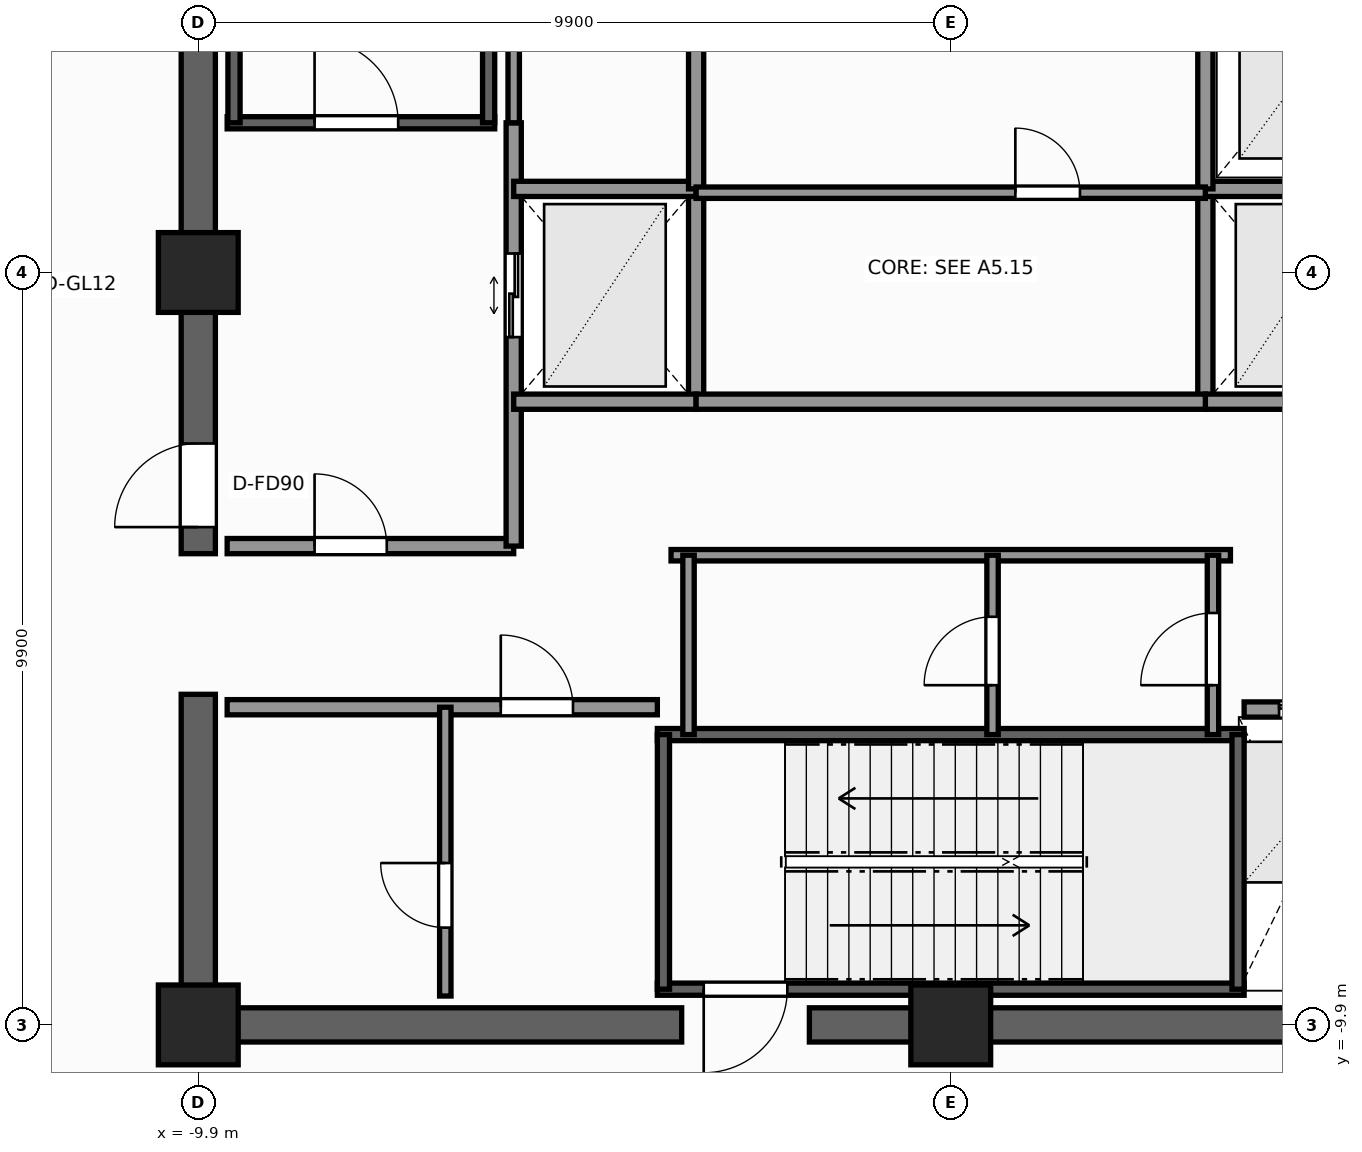
"""IFC4 building model, lengths in metres.
Left out: names, types, materials, properties, quantities, classifications, styles, units other than length and angle.
Written with IfcOpenShell. Run it as: python <this file> out.ifc"""

import sys

from ifc_helpers import new_model, si_unit, direction, frame, frame_2d, origin, origin_2d, place, context, subcontext, project, spatial, rectangle, extrude, element, fill, save


model = new_model("IFC4")
c1 = context("Model", 3, precision=1e-05, world=origin(), true_north=direction((0.0, 1.0)))
c2 = subcontext(c1, "Body", "Model", "MODEL_VIEW")
j1 = project(units=[si_unit("LENGTHUNIT", "METRE"), si_unit("PLANEANGLEUNIT", "RADIAN")], contexts=[c1])
p1 = place(None, origin())
s1 = spatial("IfcSite", under=j1, at=p1, CompositionType="ELEMENT")
p2 = place(p1, origin())
s2 = spatial("IfcBuilding", under=s1, at=p2, CompositionType="ELEMENT")
p3 = place(p2, frame((0.0, 0.0, 267.4)))
s3 = spatial("IfcBuildingStorey", under=s2, at=p3, CompositionType="ELEMENT", Elevation=267.4)
p4 = place(p3, frame((10.125, -9.9, 0.0), z_axis=(0.0, 0.0, 1.0), x_axis=(-1.0, 0.0, 0.0)))
e1 = element("IfcWall", 1, at=p4, inside=s3, PredefinedType="SHEAR", context=c2, shape_type="SweptSolid", body=[
    extrude(rectangle(XDim=11.985, YDim=0.45, at=frame_2d((5.993, 0.0))), origin(), (0.0, 0.0, 1.0), 5.0),
])
p5 = place(p3, frame((-3.54, -9.9, 0.0), z_axis=(0.0, 0.0, 1.0), x_axis=(-1.0, 0.0, 0.0)))
e2 = element("IfcWall", 2, at=p5, inside=s3, PredefinedType="SHEAR", context=c2, shape_type="SweptSolid", body=[
    extrude(rectangle(XDim=6.585, YDim=0.45, at=frame_2d((3.292, 0.0))), origin(), (0.0, 0.0, 1.0), 5.0),
])
p6 = place(p3, frame((-9.9, -9.675, 0.0), z_axis=(0.0, 0.0, 1.0), x_axis=(0.0, 1.0, 0.0)))
e3 = element("IfcWall", 3, at=p6, inside=s3, PredefinedType="SHEAR", context=c2, shape_type="SweptSolid", body=[
    extrude(rectangle(XDim=4.125, YDim=0.45, at=frame_2d((2.062, 0.0))), origin(), (0.0, 0.0, 1.0), 5.0),
])
p7 = place(p3, frame((-9.9, -3.7, 0.0), z_axis=(0.0, 0.0, 1.0), x_axis=(0.0, 1.0, 0.0)))
e4 = element("IfcWall", 4, at=p7, inside=s3, PredefinedType="SHEAR", context=c2, shape_type="SweptSolid", body=[
    extrude(rectangle(XDim=13.375, YDim=0.45, at=frame_2d((6.688, 0.0))), origin(), (0.0, 0.0, 1.0), 5.0),
])
p8 = place(p7, frame((0.35, 0.0, 0.0)))
e5 = element("IfcOpeningElement", 5, at=p8, cuts=e4, PredefinedType="OPENING", context=c2, shape_type="SweptSolid", body=[
    extrude(rectangle(XDim=1.1, YDim=2.2, at=frame_2d((0.55, 1.1))), frame((0.0, 0.235, 0.0), z_axis=(0.0, -1.0, 0.0), x_axis=(1.0, 0.0, 0.0)), (0.0, 0.0, 1.0), 0.47),
])
for number, where, z_axis, x_axis in (
    (6, (-9.9, -9.9, 0.0), (0.0, 0.0, 1.0), (1.0, 0.0, 0.0)),
    (7, (0.0, -9.9, 0.0), (0.0, 0.0, 1.0), (1.0, 0.0, 0.0)),
    (8, (-9.9, 0.0, 0.0), (0.0, 0.0, 1.0), (1.0, 0.0, 0.0)),
):
    element("IfcColumn", number, at=place(p3, frame(where, z_axis=z_axis, x_axis=x_axis)), inside=s3, PredefinedType="COLUMN", context=c2, shape_type="SweptSolid", body=[
        extrude(rectangle(XDim=1.05, YDim=1.05, at=origin_2d()), origin(), (0.0, 0.0, 1.0), 5.0),
    ])
p9 = place(p3, frame((-9.52, 1.97, 0.0), z_axis=(0.0, 0.0, 1.0), x_axis=(1.0, 0.0, 0.0)))
e9 = element("IfcWall", 9, at=p9, inside=s3, PredefinedType="SHEAR", context=c2, shape_type="SweptSolid", body=[
    extrude(rectangle(XDim=3.52, YDim=0.16, at=frame_2d((1.76, 0.0))), origin(), (0.0, 0.0, 1.0), 5.0),
])
p10 = place(p9, frame((1.15, 0.0, 0.0)))
e10 = element("IfcOpeningElement", 10, at=p10, cuts=e9, PredefinedType="OPENING", context=c2, shape_type="SweptSolid", body=[
    extrude(rectangle(XDim=1.1, YDim=2.2, at=frame_2d((0.55, 1.1))), frame((0.0, 0.09, 0.0), z_axis=(0.0, -1.0, 0.0), x_axis=(1.0, 0.0, 0.0)), (0.0, 0.0, 1.0), 0.18),
])
for number, where, z_axis, x_axis in (
    (11, (-9.43, 1.97, 0.0), (0.0, 0.0, 1.0), (0.0, 1.0, 0.0)),
    (12, (-6.08, 1.97, 0.0), (0.0, 0.0, 1.0), (0.0, 1.0, 0.0)),
):
    element("IfcWall", number, at=place(p3, frame(where, z_axis=z_axis, x_axis=x_axis)), inside=s3, PredefinedType="SHEAR", context=c2, shape_type="SweptSolid", body=[
        extrude(rectangle(XDim=7.56, YDim=0.16, at=frame_2d((3.78, 0.0))), origin(), (0.0, 0.0, 1.0), 5.0),
    ])
p11 = place(p3, frame((3.86, -9.43, 0.0), z_axis=(0.0, 0.0, 1.0), x_axis=(-1.0, 0.0, 0.0)))
e13 = element("IfcWall", 13, at=p11, inside=s3, PredefinedType="SHEAR", context=c2, shape_type="SweptSolid", body=[
    extrude(rectangle(XDim=7.72, YDim=0.16, at=frame_2d((3.86, 0.0))), origin(), (0.0, 0.0, 1.0), 5.0),
])
p12 = place(p11, frame((6.01, 0.0, 0.0)))
e14 = element("IfcOpeningElement", 14, at=p12, cuts=e13, PredefinedType="OPENING", context=c2, shape_type="SweptSolid", body=[
    extrude(rectangle(XDim=1.1, YDim=2.2, at=frame_2d((0.55, 1.1))), frame((0.0, 0.09, 0.0), z_axis=(0.0, -1.0, 0.0), x_axis=(1.0, 0.0, 0.0)), (0.0, 0.0, 1.0), 0.18),
])
p13 = place(p3, frame((-3.86, -6.08, 0.0), z_axis=(0.0, 0.0, 1.0), x_axis=(1.0, 0.0, 0.0)))
e15 = element("IfcWall", 15, at=p13, inside=s3, PredefinedType="SHEAR", context=c2, shape_type="SweptSolid", body=[
    extrude(rectangle(XDim=7.72, YDim=0.16, at=frame_2d((3.86, 0.0))), origin(), (0.0, 0.0, 1.0), 5.0),
])
for number, where, z_axis, x_axis in (
    (16, (-3.78, -9.43, 0.0), (0.0, 0.0, 1.0), (0.0, 1.0, 0.0)),
    (17, (3.78, -9.43, 0.0), (0.0, 0.0, 1.0), (0.0, 1.0, 0.0)),
):
    element("IfcWall", number, at=place(p3, frame(where, z_axis=z_axis, x_axis=x_axis)), inside=s3, PredefinedType="SHEAR", context=c2, shape_type="SweptSolid", body=[
        extrude(rectangle(XDim=3.35, YDim=0.16, at=frame_2d((1.675, 0.0))), origin(), (0.0, 0.0, 1.0), 5.0),
    ])
p14 = place(p3, frame((-9.52, -3.6, 0.0), z_axis=(0.0, 0.0, 1.0), x_axis=(1.0, 0.0, 0.0)))
e18 = element("IfcWall", 18, at=p14, inside=s3, PredefinedType="SOLIDWALL", context=c2, shape_type="SweptSolid", body=[
    extrude(rectangle(XDim=3.77, YDim=0.2, at=frame_2d((1.885, 0.0))), origin(), (0.0, 0.0, 1.0), 4.7),
])
p15 = place(p14, frame((1.15, 0.0, 0.0)))
e19 = element("IfcOpeningElement", 19, at=p15, cuts=e18, PredefinedType="OPENING", context=c2, shape_type="SweptSolid", body=[
    extrude(rectangle(XDim=0.95, YDim=2.06, at=frame_2d((0.475, 1.03))), frame((0.0, 0.11, 0.0), z_axis=(0.0, -1.0, 0.0), x_axis=(1.0, 0.0, 0.0)), (0.0, 0.0, 1.0), 0.22),
])
p16 = place(p3, frame((-5.75, -3.6, 0.0), z_axis=(0.0, 0.0, 1.0), x_axis=(0.0, 1.0, 0.0)))
e20 = element("IfcWall", 20, at=p16, inside=s3, PredefinedType="SOLIDWALL", context=c2, shape_type="SweptSolid", body=[
    extrude(rectangle(XDim=5.57, YDim=0.2, at=frame_2d((2.785, 0.0))), origin(), (0.0, 0.0, 1.0), 4.7),
])
p17 = place(p16, frame((2.75, 0.0, 0.0)))
e21 = element("IfcOpeningElement", 21, at=p17, cuts=e20, PredefinedType="OPENING", context=c2, shape_type="SweptSolid", body=[
    extrude(rectangle(XDim=1.1, YDim=2.2, at=frame_2d((0.55, 1.1))), frame((0.0, 0.11, 0.0), z_axis=(0.0, -1.0, 0.0), x_axis=(1.0, 0.0, 0.0)), (0.0, 0.0, 1.0), 0.22),
])
p18 = place(p3, frame((-3.35, -1.7, 0.0), z_axis=(0.0, 0.0, 1.0), x_axis=(0.0, 1.0, 0.0)))
e22 = element("IfcWall", 22, at=p18, inside=s3, PredefinedType="SOLIDWALL", context=c2, shape_type="SweptSolid", body=[
    extrude(rectangle(XDim=2.8, YDim=0.2, at=frame_2d((1.4, 0.0))), origin(), (0.0, 0.0, 1.0), 4.7),
])
for number, where, z_axis, x_axis in (
    (23, (-5.75, -1.7, 0.0), (0.0, 0.0, 1.0), (1.0, 0.0, 0.0)),
    (24, (-5.75, 1.1, 0.0), (0.0, 0.0, 1.0), (1.0, 0.0, 0.0)),
):
    element("IfcWall", number, at=place(p3, frame(where, z_axis=z_axis, x_axis=x_axis)), inside=s3, PredefinedType="SOLIDWALL", context=c2, shape_type="SweptSolid", body=[
        extrude(rectangle(XDim=2.4, YDim=0.2, at=frame_2d((1.2, 0.0))), origin(), (0.0, 0.0, 1.0), 4.7),
    ])
p19 = place(p3, frame((3.35, -1.7, 0.0), z_axis=(0.0, 0.0, 1.0), x_axis=(0.0, 1.0, 0.0)))
e25 = element("IfcWall", 25, at=p19, inside=s3, PredefinedType="SOLIDWALL", context=c2, shape_type="SweptSolid", body=[
    extrude(rectangle(XDim=2.8, YDim=0.2, at=frame_2d((1.4, 0.0))), origin(), (0.0, 0.0, 1.0), 4.7),
])
for number, where, z_axis, x_axis in (
    (26, (3.35, -1.7, 0.0), (0.0, 0.0, 1.0), (1.0, 0.0, 0.0)),
    (27, (3.35, 1.1, 0.0), (0.0, 0.0, 1.0), (1.0, 0.0, 0.0)),
):
    element("IfcWall", number, at=place(p3, frame(where, z_axis=z_axis, x_axis=x_axis)), inside=s3, PredefinedType="SOLIDWALL", context=c2, shape_type="SweptSolid", body=[
        extrude(rectangle(XDim=2.4, YDim=0.2, at=frame_2d((1.2, 0.0))), origin(), (0.0, 0.0, 1.0), 4.7),
    ])
p20 = place(p3, frame((-9.52, -5.72, 0.0), z_axis=(0.0, 0.0, 1.0), x_axis=(1.0, 0.0, 0.0)))
e28 = element("IfcWall", 28, at=p20, inside=s3, PredefinedType="SOLIDWALL", context=c2, shape_type="SweptSolid", body=[
    extrude(rectangle(XDim=5.66, YDim=0.2, at=frame_2d((2.83, 0.0))), origin(), (0.0, 0.0, 1.0), 4.7),
])
p21 = place(p20, frame((3.6, 0.0, 0.0)))
e29 = element("IfcOpeningElement", 29, at=p21, cuts=e28, PredefinedType="OPENING", context=c2, shape_type="SweptSolid", body=[
    extrude(rectangle(XDim=0.95, YDim=2.06, at=frame_2d((0.475, 1.03))), frame((0.0, 0.11, 0.0), z_axis=(0.0, -1.0, 0.0), x_axis=(1.0, 0.0, 0.0)), (0.0, 0.0, 1.0), 0.22),
])
p22 = place(p3, frame((-6.65, -9.52, 0.0), z_axis=(0.0, 0.0, 1.0), x_axis=(0.0, 1.0, 0.0)))
e30 = element("IfcWall", 30, at=p22, inside=s3, PredefinedType="PARTITIONING", context=c2, shape_type="SweptSolid", body=[
    extrude(rectangle(XDim=3.8, YDim=0.15, at=frame_2d((1.9, 0.0))), origin(), (0.0, 0.0, 1.0), 4.7),
])
p23 = place(p22, frame((0.9, 0.0, 0.0)))
e31 = element("IfcOpeningElement", 31, at=p23, cuts=e30, PredefinedType="OPENING", context=c2, shape_type="SweptSolid", body=[
    extrude(rectangle(XDim=0.85, YDim=2.03, at=frame_2d((0.425, 1.015))), frame((0.0, 0.085, 0.0), z_axis=(0.0, -1.0, 0.0), x_axis=(1.0, 0.0, 0.0)), (0.0, 0.0, 1.0), 0.17),
])
p24 = place(p3, frame((3.86, -5.75, 0.0), z_axis=(0.0, 0.0, 1.0), x_axis=(1.0, 0.0, 0.0)))
e32 = element("IfcWall", 32, at=p24, inside=s3, PredefinedType="SOLIDWALL", context=c2, shape_type="SweptSolid", body=[
    extrude(rectangle(XDim=5.66, YDim=0.2, at=frame_2d((2.83, 0.0))), origin(), (0.0, 0.0, 1.0), 4.7),
])
p25 = place(p24, frame((0.46, 0.0, 0.0)))
e33 = element("IfcOpeningElement", 33, at=p25, cuts=e32, PredefinedType="OPENING", context=c2, shape_type="SweptSolid", body=[
    extrude(rectangle(XDim=1.1, YDim=2.2, at=frame_2d((0.55, 1.1))), frame((0.0, 0.11, 0.0), z_axis=(0.0, -1.0, 0.0), x_axis=(1.0, 0.0, 0.0)), (0.0, 0.0, 1.0), 0.22),
])
p26 = place(p24, frame((2.39, 0.0, 0.0)))
e34 = element("IfcOpeningElement", 34, at=p26, cuts=e32, PredefinedType="OPENING", context=c2, shape_type="SweptSolid", body=[
    extrude(rectangle(XDim=1.1, YDim=2.2, at=frame_2d((0.55, 1.1))), frame((0.0, 0.11, 0.0), z_axis=(0.0, -1.0, 0.0), x_axis=(1.0, 0.0, 0.0)), (0.0, 0.0, 1.0), 0.22),
])
p27 = place(p24, frame((4.32, 0.0, 0.0)))
e35 = element("IfcOpeningElement", 35, at=p27, cuts=e32, PredefinedType="OPENING", context=c2, shape_type="SweptSolid", body=[
    extrude(rectangle(XDim=1.1, YDim=2.2, at=frame_2d((0.55, 1.1))), frame((0.0, 0.11, 0.0), z_axis=(0.0, -1.0, 0.0), x_axis=(1.0, 0.0, 0.0)), (0.0, 0.0, 1.0), 0.22),
])
p28 = place(p3, frame((-3.35, -1.7, 0.0), z_axis=(0.0, 0.0, 1.0), x_axis=(1.0, 0.0, 0.0)))
e36 = element("IfcWall", 36, at=p28, inside=s3, PredefinedType="SOLIDWALL", context=c2, shape_type="SweptSolid", body=[
    extrude(rectangle(XDim=6.7, YDim=0.2, at=frame_2d((3.35, 0.0))), origin(), (0.0, 0.0, 1.0), 4.7),
])
for number, where, z_axis, x_axis in (
    (37, (-3.35, 1.1, 0.0), (0.0, 0.0, 1.0), (0.0, 1.0, 0.0)),
    (38, (3.35, 1.1, 0.0), (0.0, 0.0, 1.0), (0.0, 1.0, 0.0)),
):
    element("IfcWall", number, at=place(p3, frame(where, z_axis=z_axis, x_axis=x_axis)), inside=s3, PredefinedType="SOLIDWALL", context=c2, shape_type="SweptSolid", body=[
        extrude(rectangle(XDim=3.2, YDim=0.2, at=frame_2d((1.6, 0.0))), origin(), (0.0, 0.0, 1.0), 4.7),
    ])
p29 = place(p3, frame((-3.35, 1.05, 0.0), z_axis=(0.0, 0.0, 1.0), x_axis=(1.0, 0.0, 0.0)))
e39 = element("IfcWall", 39, at=p29, inside=s3, PredefinedType="PARTITIONING", context=c2, shape_type="SweptSolid", body=[
    extrude(rectangle(XDim=6.7, YDim=0.15, at=frame_2d((3.35, 0.0))), origin(), (0.0, 0.0, 1.0), 4.7),
])
p30 = place(p29, frame((4.2, 0.0, 0.0)))
e40 = element("IfcOpeningElement", 40, at=p30, cuts=e39, PredefinedType="OPENING", context=c2, shape_type="SweptSolid", body=[
    extrude(rectangle(XDim=0.85, YDim=2.03, at=frame_2d((0.425, 1.015))), frame((0.0, 0.085, 0.0), z_axis=(0.0, -1.0, 0.0), x_axis=(1.0, 0.0, 0.0)), (0.0, 0.0, 1.0), 0.17),
])
p31 = place(p3, frame((-3.68, -3.72, 0.0), z_axis=(0.0, 0.0, 1.0), x_axis=(1.0, 0.0, 0.0)))
e41 = element("IfcWall", 41, at=p31, inside=s3, PredefinedType="PARTITIONING", context=c2, shape_type="SweptSolid", body=[
    extrude(rectangle(XDim=7.36, YDim=0.15, at=frame_2d((3.68, 0.0))), origin(), (0.0, 0.0, 1.0), 4.7),
])
p32 = place(p3, frame((3.45, -6.08, 0.0), z_axis=(0.0, 0.0, 1.0), x_axis=(0.0, 1.0, 0.0)))
e42 = element("IfcWall", 42, at=p32, inside=s3, PredefinedType="PARTITIONING", context=c2, shape_type="SweptSolid", body=[
    extrude(rectangle(XDim=2.36, YDim=0.15, at=frame_2d((1.18, 0.0))), origin(), (0.0, 0.0, 1.0), 4.7),
])
p33 = place(p32, frame((0.65, 0.0, 0.0)))
e43 = element("IfcOpeningElement", 43, at=p33, cuts=e42, PredefinedType="OPENING", context=c2, shape_type="SweptSolid", body=[
    extrude(rectangle(XDim=0.95, YDim=2.06, at=frame_2d((0.475, 1.03))), frame((0.0, 0.085, 0.0), z_axis=(0.0, -1.0, 0.0), x_axis=(1.0, 0.0, 0.0)), (0.0, 0.0, 1.0), 0.17),
])
p34 = place(p3, frame((-3.45, -6.08, 0.0), z_axis=(0.0, 0.0, 1.0), x_axis=(0.0, 1.0, 0.0)))
e44 = element("IfcWall", 44, at=p34, inside=s3, PredefinedType="PARTITIONING", context=c2, shape_type="SweptSolid", body=[
    extrude(rectangle(XDim=2.36, YDim=0.15, at=frame_2d((1.18, 0.0))), origin(), (0.0, 0.0, 1.0), 4.7),
])
p35 = place(p3, frame((0.55, -6.08, 0.0), z_axis=(0.0, 0.0, 1.0), x_axis=(0.0, 1.0, 0.0)))
e45 = element("IfcWall", 45, at=p35, inside=s3, PredefinedType="PARTITIONING", context=c2, shape_type="SweptSolid", body=[
    extrude(rectangle(XDim=2.36, YDim=0.15, at=frame_2d((1.18, 0.0))), origin(), (0.0, 0.0, 1.0), 4.7),
])
p36 = place(p35, frame((0.65, 0.0, 0.0)))
e46 = element("IfcOpeningElement", 46, at=p36, cuts=e45, PredefinedType="OPENING", context=c2, shape_type="SweptSolid", body=[
    extrude(rectangle(XDim=0.9, YDim=2.06, at=frame_2d((0.45, 1.03))), frame((0.0, 0.085, 0.0), z_axis=(0.0, -1.0, 0.0), x_axis=(1.0, 0.0, 0.0)), (0.0, 0.0, 1.0), 0.17),
])
p37 = place(p3, frame((-5.75, 1.97, 0.0), z_axis=(0.0, 0.0, 1.0), x_axis=(0.0, 1.0, 0.0)))
e47 = element("IfcWall", 47, at=p37, inside=s3, PredefinedType="PARTITIONING", context=c2, shape_type="SweptSolid", body=[
    extrude(rectangle(XDim=2.33, YDim=0.15, at=frame_2d((1.165, 0.0))), origin(), (0.0, 0.0, 1.0), 4.7),
])
p38 = place(p10, origin())
e48 = element("IfcDoor", 48, at=p38, inside=s3, OperationType="SINGLE_SWING_LEFT", PredefinedType="DOOR", context=c2, shape_type="SweptSolid", body=[
    extrude(rectangle(XDim=1.1, YDim=2.2, at=frame_2d((0.55, 1.1))), frame((0.0, 0.025, 0.0), z_axis=(0.0, -1.0, 0.0), x_axis=(1.0, 0.0, 0.0)), (0.0, 0.0, 1.0), 0.05),
])
fill(e10, e48)
p39 = place(p12, origin())
e49 = element("IfcDoor", 49, at=p39, inside=s3, OperationType="SINGLE_SWING_RIGHT", PredefinedType="DOOR", context=c2, shape_type="SweptSolid", body=[
    extrude(rectangle(XDim=1.1, YDim=2.2, at=frame_2d((0.55, 1.1))), frame((0.0, 0.025, 0.0), z_axis=(0.0, -1.0, 0.0), x_axis=(1.0, 0.0, 0.0)), (0.0, 0.0, 1.0), 0.05),
])
fill(e14, e49)
p40 = place(p8, origin())
e50 = element("IfcDoor", 50, at=p40, inside=s3, OperationType="SINGLE_SWING_LEFT", PredefinedType="DOOR", context=c2, shape_type="SweptSolid", body=[
    extrude(rectangle(XDim=1.1, YDim=2.2, at=frame_2d((0.55, 1.1))), frame((0.0, 0.025, 0.0), z_axis=(0.0, -1.0, 0.0), x_axis=(1.0, 0.0, 0.0)), (0.0, 0.0, 1.0), 0.05),
])
fill(e5, e50)
p41 = place(p17, origin())
e51 = element("IfcDoor", 51, at=p41, inside=s3, OperationType="DOUBLE_DOOR_SLIDING", PredefinedType="DOOR", context=c2, shape_type="SweptSolid", body=[
    extrude(rectangle(XDim=1.1, YDim=2.2, at=frame_2d((0.55, 1.1))), frame((0.0, 0.025, 0.0), z_axis=(0.0, -1.0, 0.0), x_axis=(1.0, 0.0, 0.0)), (0.0, 0.0, 1.0), 0.05),
])
fill(e21, e51)
p42 = place(p21, origin())
e52 = element("IfcDoor", 52, at=p42, inside=s3, OperationType="SINGLE_SWING_LEFT", PredefinedType="DOOR", context=c2, shape_type="SweptSolid", body=[
    extrude(rectangle(XDim=0.95, YDim=2.06, at=frame_2d((0.475, 1.03))), frame((0.0, 0.025, 0.0), z_axis=(0.0, -1.0, 0.0), x_axis=(1.0, 0.0, 0.0)), (0.0, 0.0, 1.0), 0.05),
])
fill(e29, e52)
p43 = place(p23, origin())
e53 = element("IfcDoor", 53, at=p43, inside=s3, OperationType="SINGLE_SWING_RIGHT", PredefinedType="DOOR", context=c2, shape_type="SweptSolid", body=[
    extrude(rectangle(XDim=0.85, YDim=2.03, at=frame_2d((0.425, 1.015))), frame((0.0, 0.025, 0.0), z_axis=(0.0, -1.0, 0.0), x_axis=(1.0, 0.0, 0.0)), (0.0, 0.0, 1.0), 0.05),
])
fill(e31, e53)
p44 = place(p15, origin())
e54 = element("IfcDoor", 54, at=p44, inside=s3, OperationType="SINGLE_SWING_LEFT", PredefinedType="DOOR", context=c2, shape_type="SweptSolid", body=[
    extrude(rectangle(XDim=0.95, YDim=2.06, at=frame_2d((0.475, 1.03))), frame((0.0, 0.025, 0.0), z_axis=(0.0, -1.0, 0.0), x_axis=(1.0, 0.0, 0.0)), (0.0, 0.0, 1.0), 0.05),
])
fill(e19, e54)
p45 = place(p25, origin())
e55 = element("IfcDoor", 55, at=p45, inside=s3, OperationType="DOUBLE_DOOR_SLIDING", PredefinedType="DOOR", context=c2, shape_type="SweptSolid", body=[
    extrude(rectangle(XDim=1.1, YDim=2.2, at=frame_2d((0.55, 1.1))), frame((0.0, 0.025, 0.0), z_axis=(0.0, -1.0, 0.0), x_axis=(1.0, 0.0, 0.0)), (0.0, 0.0, 1.0), 0.05),
])
fill(e33, e55)
p46 = place(p30, origin())
e56 = element("IfcDoor", 56, at=p46, inside=s3, OperationType="SINGLE_SWING_LEFT", PredefinedType="DOOR", context=c2, shape_type="SweptSolid", body=[
    extrude(rectangle(XDim=0.85, YDim=2.03, at=frame_2d((0.425, 1.015))), frame((0.0, 0.025, 0.0), z_axis=(0.0, -1.0, 0.0), x_axis=(1.0, 0.0, 0.0)), (0.0, 0.0, 1.0), 0.05),
])
fill(e40, e56)
p47 = place(p33, origin())
e57 = element("IfcDoor", 57, at=p47, inside=s3, OperationType="SINGLE_SWING_LEFT", PredefinedType="DOOR", context=c2, shape_type="SweptSolid", body=[
    extrude(rectangle(XDim=0.95, YDim=2.06, at=frame_2d((0.475, 1.03))), frame((0.0, 0.025, 0.0), z_axis=(0.0, -1.0, 0.0), x_axis=(1.0, 0.0, 0.0)), (0.0, 0.0, 1.0), 0.05),
])
fill(e43, e57)
p48 = place(p36, origin())
e58 = element("IfcDoor", 58, at=p48, inside=s3, OperationType="SINGLE_SWING_LEFT", PredefinedType="DOOR", context=c2, shape_type="SweptSolid", body=[
    extrude(rectangle(XDim=0.9, YDim=2.06, at=frame_2d((0.45, 1.03))), frame((0.0, 0.025, 0.0), z_axis=(0.0, -1.0, 0.0), x_axis=(1.0, 0.0, 0.0)), (0.0, 0.0, 1.0), 0.05),
])
fill(e46, e58)
save(model, sys.argv[1])
